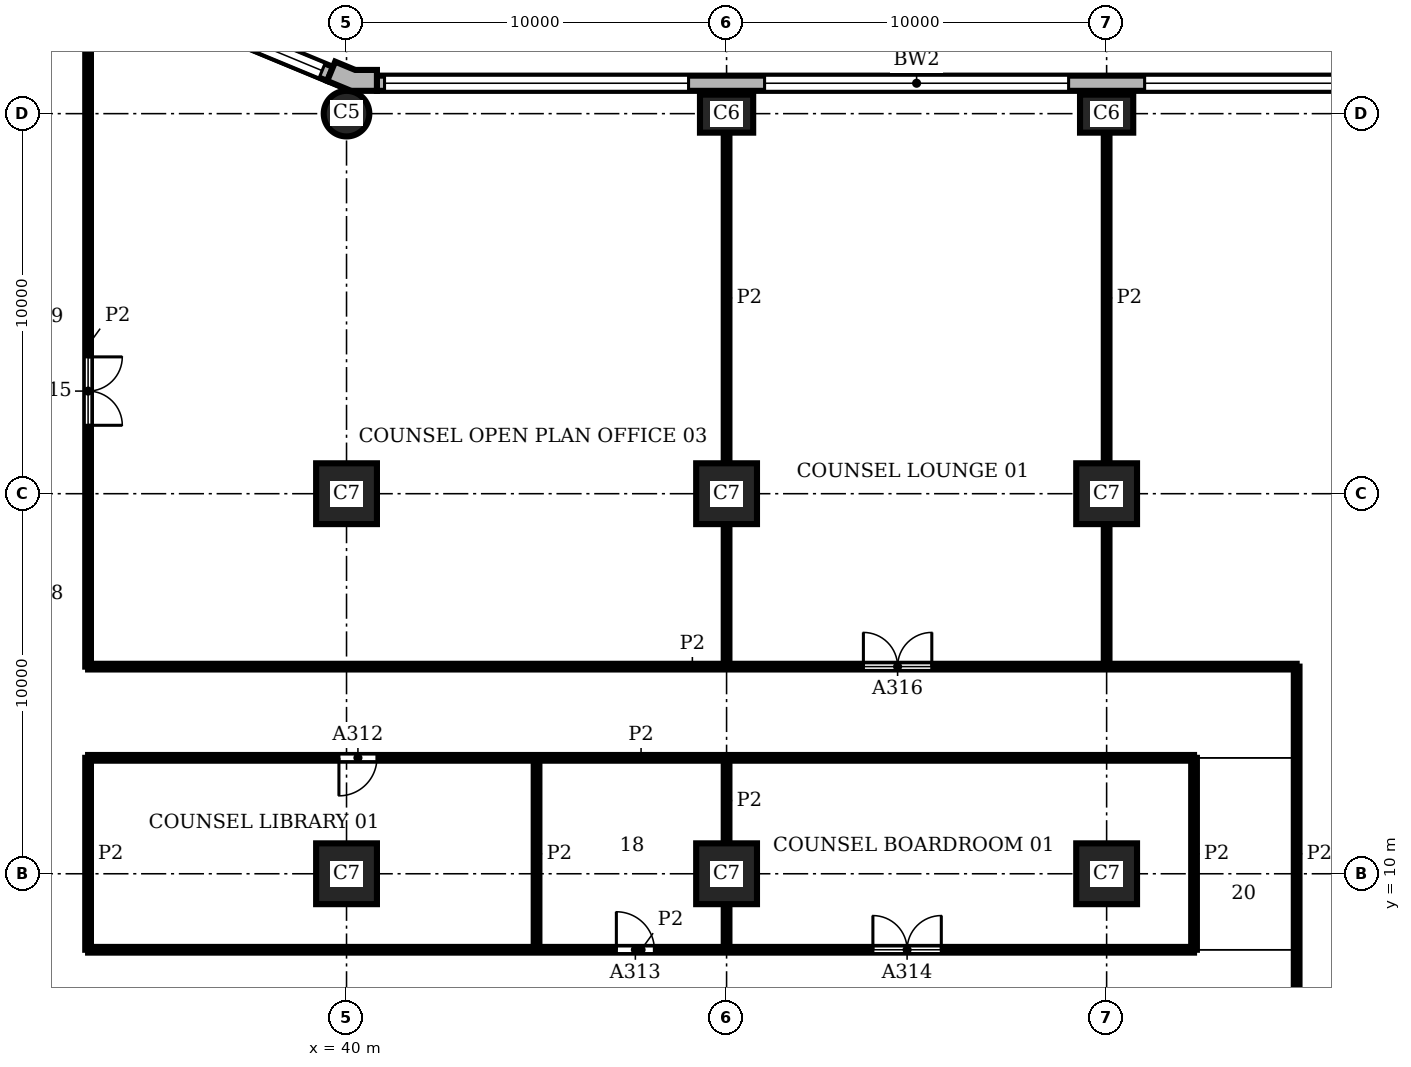
"""IFC4 building model, lengths in metres.
Left out: names, types, materials, properties, quantities, classifications, styles, units other than length and angle.
Written with IfcOpenShell. Run it as: python <this file> out.ifc"""

import sys

from ifc_helpers import new_model, si_unit, direction, frame, frame_2d, origin, origin_2d, place, context, subcontext, project, spatial, polyline, rectangle, circle, outline, extrude, element, fill, save


model = new_model("IFC4")
c1 = context("Model", 3, precision=1e-05, world=origin(), true_north=direction((0.0, 1.0)))
c2 = subcontext(c1, "Body", "Model", "MODEL_VIEW")
j1 = project(units=[si_unit("LENGTHUNIT", "METRE"), si_unit("PLANEANGLEUNIT", "RADIAN")], contexts=[c1])
p1 = place(None, origin())
s1 = spatial("IfcSite", under=j1, at=p1, CompositionType="ELEMENT")
p2 = place(p1, origin())
s2 = spatial("IfcBuilding", under=s1, at=p2, CompositionType="ELEMENT")
p3 = place(p2, frame((0.0, 0.0, 43.2)))
s3 = spatial("IfcBuildingStorey", under=s2, at=p3, CompositionType="ELEMENT", Elevation=43.2)
for number, where, z_axis, x_axis in (
    (1, (60.0, 30.0, 0.0), (0.0, 0.0, 1.0), (1.0, 0.0, 0.0)),
    (2, (50.0, 30.0, 0.0), (0.0, 0.0, 1.0), (1.0, 0.0, 0.0)),
):
    element("IfcColumn", number, at=place(p3, frame(where, z_axis=z_axis, x_axis=x_axis)), inside=s3, PredefinedType="COLUMN", context=c2, shape_type="SweptSolid", body=[
        extrude(rectangle(XDim=1.4, YDim=1.0, at=origin_2d()), origin(), (0.0, 0.0, 1.0), 3.9),
    ])
p4 = place(p3, frame((40.0, 30.0, 0.0), z_axis=(0.0, 0.0, 1.0), x_axis=(1.0, 0.0, 0.0)))
e3 = element("IfcColumn", 3, at=p4, inside=s3, PredefinedType="COLUMN", context=c2, shape_type="SweptSolid", body=[
    extrude(circle(Radius=0.6, at=origin_2d()), origin(), (0.0, 0.0, 1.0), 3.9),
])
for number, where, z_axis, x_axis in (
    (4, (40.0, 10.0, 0.0), (0.0, 0.0, 1.0), (1.0, 0.0, 0.0)),
    (5, (40.0, 20.0, 0.0), (0.0, 0.0, 1.0), (1.0, 0.0, 0.0)),
    (6, (50.0, 10.0, 0.0), (0.0, 0.0, 1.0), (1.0, 0.0, 0.0)),
    (7, (50.0, 20.0, 0.0), (0.0, 0.0, 1.0), (1.0, 0.0, 0.0)),
    (8, (60.0, 10.0, 0.0), (0.0, 0.0, 1.0), (1.0, 0.0, 0.0)),
    (9, (60.0, 20.0, 0.0), (0.0, 0.0, 1.0), (1.0, 0.0, 0.0)),
):
    element("IfcColumn", number, at=place(p3, frame(where, z_axis=z_axis, x_axis=x_axis)), inside=s3, PredefinedType="COLUMN", context=c2, shape_type="SweptSolid", body=[
        extrude(rectangle(XDim=1.6, YDim=1.6, at=origin_2d()), origin(), (0.0, 0.0, 1.0), 3.9),
    ])
p5 = place(p3, origin())
e10 = element("IfcWall", 10, at=p5, inside=s3, PredefinedType="SOLIDWALL", context=c2, shape_type="SweptSolid", body=[
    extrude(outline(polyline([(40.8, 31.0), (40.8, 31.15), (40.229, 31.15), (39.701, 31.369), (39.644, 31.23), (39.49, 30.861), (40.119, 30.6), (40.8, 30.6), (40.8, 31.0)])), origin(), (0.0, 0.0, 1.0), 3.9),
])
p6 = place(p3, frame((69.2, 30.8, 0.0), z_axis=(0.0, 0.0, 1.0), x_axis=(-1.0, 0.0, 0.0)))
e11 = element("IfcWall", 11, at=p6, inside=s3, PredefinedType="SOLIDWALL", context=c2, shape_type="SweptSolid", body=[
    extrude(rectangle(XDim=28.4, YDim=0.4, at=frame_2d((14.2, 0.0))), origin(), (0.0, 0.0, 1.0), 3.9),
])
p7 = place(p6, frame((0.2, 0.0, 0.9)))
e12 = element("IfcOpeningElement", 12, at=p7, cuts=e11, PredefinedType="OPENING", context=c2, shape_type="SweptSolid", body=[
    extrude(rectangle(XDim=8.0, YDim=2.35, at=frame_2d((4.0, 1.175))), frame((0.0, 0.21, 0.0), z_axis=(0.0, -1.0, 0.0), x_axis=(1.0, 0.0, 0.0)), (0.0, 0.0, 1.0), 0.42),
])
p8 = place(p6, frame((10.2, 0.0, 0.9)))
e13 = element("IfcOpeningElement", 13, at=p8, cuts=e11, PredefinedType="OPENING", context=c2, shape_type="SweptSolid", body=[
    extrude(rectangle(XDim=8.0, YDim=2.35, at=frame_2d((4.0, 1.175))), frame((0.0, 0.21, 0.0), z_axis=(0.0, -1.0, 0.0), x_axis=(1.0, 0.0, 0.0)), (0.0, 0.0, 1.0), 0.42),
])
p9 = place(p6, frame((20.2, 0.0, 0.9)))
e14 = element("IfcOpeningElement", 14, at=p9, cuts=e11, PredefinedType="OPENING", context=c2, shape_type="SweptSolid", body=[
    extrude(rectangle(XDim=8.0, YDim=2.35, at=frame_2d((4.0, 1.175))), frame((0.0, 0.21, 0.0), z_axis=(0.0, -1.0, 0.0), x_axis=(1.0, 0.0, 0.0)), (0.0, 0.0, 1.0), 0.42),
])
p10 = place(p3, frame((39.567, 31.045, 0.0), z_axis=(0.0, 0.0, 1.0), x_axis=(-0.923891000409, 0.382655745237, 0.0)))
e15 = element("IfcWall", 15, at=p10, inside=s3, PredefinedType="SOLIDWALL", context=c2, shape_type="SweptSolid", body=[
    extrude(rectangle(XDim=6.053, YDim=0.4, at=frame_2d((3.027, 0.0))), origin(), (0.0, 0.0, 1.0), 3.9),
])
p11 = place(p10, frame((0.227, 0.0, 0.9)))
e16 = element("IfcOpeningElement", 16, at=p11, cuts=e15, PredefinedType="OPENING", context=c2, shape_type="SweptSolid", body=[
    extrude(rectangle(XDim=5.6, YDim=2.35, at=frame_2d((2.8, 1.175))), frame((0.0, 0.21, 0.0), z_axis=(0.0, -1.0, 0.0), x_axis=(1.0, 0.0, 0.0)), (0.0, 0.0, 1.0), 0.42),
])
p12 = place(p3, frame((33.2, 8.0, 0.0), z_axis=(0.0, 0.0, 1.0), x_axis=(0.0, 1.0, 0.0)))
e17 = element("IfcWall", 17, at=p12, inside=s3, PredefinedType="PARTITIONING", context=c2, shape_type="SweptSolid", body=[
    extrude(rectangle(XDim=5.05, YDim=0.15, at=frame_2d((2.525, 0.0))), origin(), (0.0, 0.0, 1.0), 3.58),
])
p13 = place(p3, frame((33.2, 15.45, 0.0), z_axis=(0.0, 0.0, 1.0), x_axis=(0.0, 1.0, 0.0)))
e18 = element("IfcWall", 18, at=p13, inside=s3, PredefinedType="PARTITIONING", context=c2, shape_type="SweptSolid", body=[
    extrude(rectangle(XDim=16.912, YDim=0.15, at=frame_2d((8.456, 0.0))), origin(), (0.0, 0.0, 1.0), 3.58),
])
p14 = place(p13, frame((6.35, 0.0, 0.0)))
e19 = element("IfcOpeningElement", 19, at=p14, cuts=e18, PredefinedType="OPENING", context=c2, shape_type="SweptSolid", body=[
    extrude(rectangle(XDim=1.8, YDim=2.1, at=frame_2d((0.9, 1.05))), frame((0.0, 0.085, 0.0), z_axis=(0.0, -1.0, 0.0), x_axis=(1.0, 0.0, 0.0)), (0.0, 0.0, 1.0), 0.17),
])
p15 = place(p3, frame((45.0, 8.0, 0.0), z_axis=(0.0, 0.0, 1.0), x_axis=(0.0, 1.0, 0.0)))
e20 = element("IfcWall", 20, at=p15, inside=s3, PredefinedType="PARTITIONING", context=c2, shape_type="SweptSolid", body=[
    extrude(rectangle(XDim=5.05, YDim=0.15, at=frame_2d((2.525, 0.0))), origin(), (0.0, 0.0, 1.0), 3.58),
])
p16 = place(p3, frame((50.0, 8.0, 0.0), z_axis=(0.0, 0.0, 1.0), x_axis=(0.0, 1.0, 0.0)))
e21 = element("IfcWall", 21, at=p16, inside=s3, PredefinedType="PARTITIONING", context=c2, shape_type="SweptSolid", body=[
    extrude(rectangle(XDim=1.2, YDim=0.15, at=frame_2d((0.6, 0.0))), origin(), (0.0, 0.0, 1.0), 3.58),
])
p17 = place(p3, frame((50.0, 10.8, 0.0), z_axis=(0.0, 0.0, 1.0), x_axis=(0.0, 1.0, 0.0)))
e22 = element("IfcWall", 22, at=p17, inside=s3, PredefinedType="PARTITIONING", context=c2, shape_type="SweptSolid", body=[
    extrude(rectangle(XDim=2.25, YDim=0.15, at=frame_2d((1.125, 0.0))), origin(), (0.0, 0.0, 1.0), 3.58),
])
p18 = place(p3, frame((50.0, 15.45, 0.0), z_axis=(0.0, 0.0, 1.0), x_axis=(0.0, 1.0, 0.0)))
e23 = element("IfcWall", 23, at=p18, inside=s3, PredefinedType="PARTITIONING", context=c2, shape_type="SweptSolid", body=[
    extrude(rectangle(XDim=3.75, YDim=0.15, at=frame_2d((1.875, 0.0))), origin(), (0.0, 0.0, 1.0), 3.58),
])
p19 = place(p3, frame((50.0, 20.8, 0.0), z_axis=(0.0, 0.0, 1.0), x_axis=(0.0, 1.0, 0.0)))
e24 = element("IfcWall", 24, at=p19, inside=s3, PredefinedType="PARTITIONING", context=c2, shape_type="SweptSolid", body=[
    extrude(rectangle(XDim=8.7, YDim=0.15, at=frame_2d((4.35, 0.0))), origin(), (0.0, 0.0, 1.0), 3.58),
])
p20 = place(p3, frame((60.0, 15.45, 0.0), z_axis=(0.0, 0.0, 1.0), x_axis=(0.0, 1.0, 0.0)))
e25 = element("IfcWall", 25, at=p20, inside=s3, PredefinedType="PARTITIONING", context=c2, shape_type="SweptSolid", body=[
    extrude(rectangle(XDim=3.75, YDim=0.15, at=frame_2d((1.875, 0.0))), origin(), (0.0, 0.0, 1.0), 3.58),
])
p21 = place(p3, frame((60.0, 20.8, 0.0), z_axis=(0.0, 0.0, 1.0), x_axis=(0.0, 1.0, 0.0)))
e26 = element("IfcWall", 26, at=p21, inside=s3, PredefinedType="PARTITIONING", context=c2, shape_type="SweptSolid", body=[
    extrude(rectangle(XDim=8.7, YDim=0.15, at=frame_2d((4.35, 0.0))), origin(), (0.0, 0.0, 1.0), 3.58),
])
p22 = place(p3, frame((62.3, 8.0, 0.0), z_axis=(0.0, 0.0, 1.0), x_axis=(0.0, 1.0, 0.0)))
e27 = element("IfcWall", 27, at=p22, inside=s3, PredefinedType="PARTITIONING", context=c2, shape_type="SweptSolid", body=[
    extrude(rectangle(XDim=5.05, YDim=0.15, at=frame_2d((2.525, 0.0))), origin(), (0.0, 0.0, 1.0), 3.58),
])
p23 = place(p3, frame((65.0, 5.6, 0.0), z_axis=(0.0, 0.0, 1.0), x_axis=(0.0, 1.0, 0.0)))
e28 = element("IfcWall", 28, at=p23, inside=s3, PredefinedType="PARTITIONING", context=c2, shape_type="SweptSolid", body=[
    extrude(rectangle(XDim=9.85, YDim=0.15, at=frame_2d((4.925, 0.0))), origin(), (0.0, 0.0, 1.0), 3.58),
])
p24 = place(p3, frame((33.2, 8.0, 0.0), z_axis=(0.0, 0.0, 1.0), x_axis=(1.0, 0.0, 0.0)))
e29 = element("IfcWall", 29, at=p24, inside=s3, PredefinedType="PARTITIONING", context=c2, shape_type="SweptSolid", body=[
    extrude(rectangle(XDim=29.1, YDim=0.15, at=frame_2d((14.55, 0.0))), origin(), (0.0, 0.0, 1.0), 3.58),
])
p25 = place(p24, frame((13.9, 0.0, 0.0)))
e30 = element("IfcOpeningElement", 30, at=p25, cuts=e29, PredefinedType="OPENING", context=c2, shape_type="SweptSolid", body=[
    extrude(rectangle(XDim=1.0, YDim=2.1, at=frame_2d((0.5, 1.05))), frame((0.0, 0.085, 0.0), z_axis=(0.0, -1.0, 0.0), x_axis=(1.0, 0.0, 0.0)), (0.0, 0.0, 1.0), 0.17),
])
p26 = place(p24, frame((20.65, 0.0, 0.0)))
e31 = element("IfcOpeningElement", 31, at=p26, cuts=e29, PredefinedType="OPENING", context=c2, shape_type="SweptSolid", body=[
    extrude(rectangle(XDim=1.8, YDim=2.1, at=frame_2d((0.9, 1.05))), frame((0.0, 0.085, 0.0), z_axis=(0.0, -1.0, 0.0), x_axis=(1.0, 0.0, 0.0)), (0.0, 0.0, 1.0), 0.17),
])
p27 = place(p3, frame((33.2, 13.05, 0.0), z_axis=(0.0, 0.0, 1.0), x_axis=(1.0, 0.0, 0.0)))
e32 = element("IfcWall", 32, at=p27, inside=s3, PredefinedType="PARTITIONING", context=c2, shape_type="SweptSolid", body=[
    extrude(rectangle(XDim=29.1, YDim=0.15, at=frame_2d((14.55, 0.0))), origin(), (0.0, 0.0, 1.0), 3.58),
])
p28 = place(p27, frame((6.6, 0.0, 0.0)))
e33 = element("IfcOpeningElement", 33, at=p28, cuts=e32, PredefinedType="OPENING", context=c2, shape_type="SweptSolid", body=[
    extrude(rectangle(XDim=1.0, YDim=2.1, at=frame_2d((0.5, 1.05))), frame((0.0, 0.085, 0.0), z_axis=(0.0, -1.0, 0.0), x_axis=(1.0, 0.0, 0.0)), (0.0, 0.0, 1.0), 0.17),
])
p29 = place(p3, frame((33.2, 15.45, 0.0), z_axis=(0.0, 0.0, 1.0), x_axis=(1.0, 0.0, 0.0)))
e34 = element("IfcWall", 34, at=p29, inside=s3, PredefinedType="PARTITIONING", context=c2, shape_type="SweptSolid", body=[
    extrude(rectangle(XDim=31.8, YDim=0.15, at=frame_2d((15.9, 0.0))), origin(), (0.0, 0.0, 1.0), 3.58),
])
p30 = place(p29, frame((20.4, 0.0, 0.0)))
e35 = element("IfcOpeningElement", 35, at=p30, cuts=e34, PredefinedType="OPENING", context=c2, shape_type="SweptSolid", body=[
    extrude(rectangle(XDim=1.8, YDim=2.1, at=frame_2d((0.9, 1.05))), frame((0.0, 0.085, 0.0), z_axis=(0.0, -1.0, 0.0), x_axis=(1.0, 0.0, 0.0)), (0.0, 0.0, 1.0), 0.17),
])
p31 = place(p7, origin())
e36 = element("IfcWindow", 36, at=p31, inside=s3, PartitioningType="SINGLE_PANEL", PredefinedType="WINDOW", context=c2, shape_type="SweptSolid", body=[
    extrude(rectangle(XDim=8.0, YDim=2.35, at=frame_2d((4.0, 1.175))), frame((0.0, 0.16, 0.0), z_axis=(0.0, -1.0, 0.0), x_axis=(1.0, 0.0, 0.0)), (0.0, 0.0, 1.0), 0.06),
])
fill(e12, e36)
p32 = place(p8, origin())
e37 = element("IfcWindow", 37, at=p32, inside=s3, PartitioningType="SINGLE_PANEL", PredefinedType="WINDOW", context=c2, shape_type="SweptSolid", body=[
    extrude(rectangle(XDim=8.0, YDim=2.35, at=frame_2d((4.0, 1.175))), frame((0.0, 0.16, 0.0), z_axis=(0.0, -1.0, 0.0), x_axis=(1.0, 0.0, 0.0)), (0.0, 0.0, 1.0), 0.06),
])
fill(e13, e37)
p33 = place(p9, origin())
e38 = element("IfcWindow", 38, at=p33, inside=s3, PartitioningType="SINGLE_PANEL", PredefinedType="WINDOW", context=c2, shape_type="SweptSolid", body=[
    extrude(rectangle(XDim=8.0, YDim=2.35, at=frame_2d((4.0, 1.175))), frame((0.0, 0.16, 0.0), z_axis=(0.0, -1.0, 0.0), x_axis=(1.0, 0.0, 0.0)), (0.0, 0.0, 1.0), 0.06),
])
fill(e14, e38)
p34 = place(p11, origin())
e39 = element("IfcWindow", 39, at=p34, inside=s3, PartitioningType="SINGLE_PANEL", PredefinedType="WINDOW", context=c2, shape_type="SweptSolid", body=[
    extrude(rectangle(XDim=5.6, YDim=2.35, at=frame_2d((2.8, 1.175))), frame((0.0, 0.16, 0.0), z_axis=(0.0, -1.0, 0.0), x_axis=(1.0, 0.0, 0.0)), (0.0, 0.0, 1.0), 0.06),
])
fill(e16, e39)
p35 = place(p28, frame((1.0, 0.0, 0.0), z_axis=(0.0, 0.0, 1.0), x_axis=(-1.0, 0.0, 0.0)))
e40 = element("IfcDoor", 40, at=p35, inside=s3, OperationType="SINGLE_SWING_RIGHT", PredefinedType="DOOR", context=c2, shape_type="SweptSolid", body=[
    extrude(rectangle(XDim=1.0, YDim=2.1, at=frame_2d((0.5, 1.05))), frame((0.0, 0.025, 0.0), z_axis=(0.0, -1.0, 0.0), x_axis=(1.0, 0.0, 0.0)), (0.0, 0.0, 1.0), 0.05),
])
fill(e33, e40)
p36 = place(p25, origin())
e41 = element("IfcDoor", 41, at=p36, inside=s3, OperationType="SINGLE_SWING_LEFT", PredefinedType="DOOR", context=c2, shape_type="SweptSolid", body=[
    extrude(rectangle(XDim=1.0, YDim=2.1, at=frame_2d((0.5, 1.05))), frame((0.0, 0.025, 0.0), z_axis=(0.0, -1.0, 0.0), x_axis=(1.0, 0.0, 0.0)), (0.0, 0.0, 1.0), 0.05),
])
fill(e30, e41)
p37 = place(p26, origin())
e42 = element("IfcDoor", 42, at=p37, inside=s3, OperationType="DOUBLE_DOOR_SINGLE_SWING", PredefinedType="DOOR", context=c2, shape_type="SweptSolid", body=[
    extrude(rectangle(XDim=1.8, YDim=2.1, at=frame_2d((0.9, 1.05))), frame((0.0, 0.025, 0.0), z_axis=(0.0, -1.0, 0.0), x_axis=(1.0, 0.0, 0.0)), (0.0, 0.0, 1.0), 0.05),
])
fill(e31, e42)
p38 = place(p14, frame((1.8, 0.0, 0.0), z_axis=(0.0, 0.0, 1.0), x_axis=(-1.0, 0.0, 0.0)))
e43 = element("IfcDoor", 43, at=p38, inside=s3, OperationType="DOUBLE_DOOR_SINGLE_SWING", PredefinedType="DOOR", context=c2, shape_type="SweptSolid", body=[
    extrude(rectangle(XDim=1.8, YDim=2.1, at=frame_2d((0.9, 1.05))), frame((0.0, 0.025, 0.0), z_axis=(0.0, -1.0, 0.0), x_axis=(1.0, 0.0, 0.0)), (0.0, 0.0, 1.0), 0.05),
])
fill(e19, e43)
p39 = place(p30, origin())
e44 = element("IfcDoor", 44, at=p39, inside=s3, OperationType="DOUBLE_DOOR_SINGLE_SWING", PredefinedType="DOOR", context=c2, shape_type="SweptSolid", body=[
    extrude(rectangle(XDim=1.8, YDim=2.1, at=frame_2d((0.9, 1.05))), frame((0.0, 0.025, 0.0), z_axis=(0.0, -1.0, 0.0), x_axis=(1.0, 0.0, 0.0)), (0.0, 0.0, 1.0), 0.05),
])
fill(e35, e44)
save(model, sys.argv[1])
